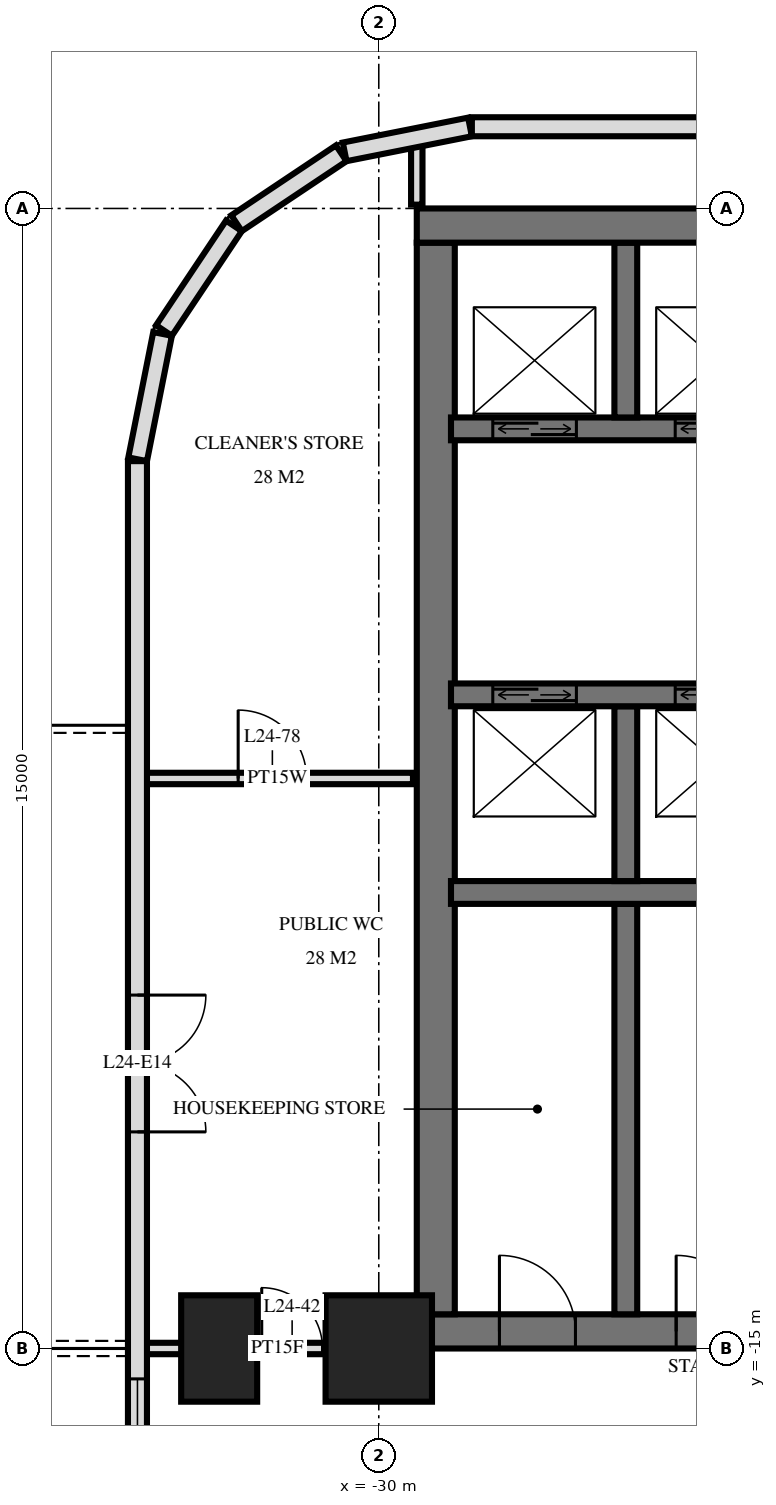
"""IFC4 building model, lengths in metres.
Left out: names, types, materials, properties, quantities, classifications, styles, units other than length and angle.
Written with IfcOpenShell. Run it as: python <this file> out.ifc"""

import sys

from ifc_helpers import new_model, si_unit, direction, frame, frame_2d, origin, origin_2d, place, context, subcontext, project, spatial, rectangle, extrude, element, fill, save


model = new_model("IFC4")
c1 = context("Model", 3, precision=1e-05, world=origin(), true_north=direction((0.0, 1.0)))
c2 = subcontext(c1, "Body", "Model", "MODEL_VIEW")
j1 = project(units=[si_unit("LENGTHUNIT", "METRE"), si_unit("PLANEANGLEUNIT", "RADIAN")], contexts=[c1])
p1 = place(None, origin())
s1 = spatial("IfcSite", under=j1, at=p1, CompositionType="ELEMENT")
p2 = place(p1, origin())
s2 = spatial("IfcBuilding", under=s1, at=p2, CompositionType="ELEMENT")
p3 = place(p2, frame((0.0, 0.0, 96.0)))
s3 = spatial("IfcBuildingStorey", under=s2, at=p3, CompositionType="ELEMENT", Elevation=96.0)
p4 = place(p3, frame((-32.1, -15.0, 0.0), z_axis=(0.0, 0.0, 1.0), x_axis=(0.0, 1.0, 0.0)))
e1 = element("IfcColumn", 1, at=p4, inside=s3, PredefinedType="COLUMN", context=c2, shape_type="SweptSolid", body=[
    extrude(rectangle(XDim=1.4, YDim=1.0, at=origin_2d()), origin(), (0.0, 0.0, 1.0), 3.6),
])
p5 = place(p3, frame((-30.0, -15.0, 0.0), z_axis=(0.0, 0.0, 1.0), x_axis=(1.0, 0.0, 0.0)))
e2 = element("IfcColumn", 2, at=p5, inside=s3, PredefinedType="COLUMN", context=c2, shape_type="SweptSolid", body=[
    extrude(rectangle(XDim=1.4, YDim=1.4, at=origin_2d()), origin(), (0.0, 0.0, 1.0), 3.6),
])
p6 = place(p3, frame((-29.5, -0.225, 0.0), z_axis=(0.0, 0.0, 1.0), x_axis=(1.0, 0.0, 0.0)))
e3 = element("IfcWall", 3, at=p6, inside=s3, PredefinedType="SHEAR", context=c2, shape_type="SweptSolid", body=[
    extrude(rectangle(XDim=19.5, YDim=0.45, at=frame_2d((9.75, 0.0))), origin(), (0.0, 0.0, 1.0), 3.6),
])
p7 = place(p3, frame((-29.5, -14.775, 0.0), z_axis=(0.0, 0.0, 1.0), x_axis=(1.0, 0.0, 0.0)))
e4 = element("IfcWall", 4, at=p7, inside=s3, PredefinedType="SHEAR", context=c2, shape_type="SweptSolid", body=[
    extrude(rectangle(XDim=19.5, YDim=0.45, at=frame_2d((9.75, 0.0))), origin(), (0.0, 0.0, 1.0), 3.6),
])
p8 = place(p7, frame((11.2, 0.0, 0.0)))
e5 = element("IfcOpeningElement", 5, at=p8, cuts=e4, PredefinedType="OPENING", context=c2, shape_type="SweptSolid", body=[
    extrude(rectangle(XDim=1.2, YDim=2.1, at=frame_2d((0.6, 1.05))), frame((0.0, 0.235, 0.0), z_axis=(0.0, -1.0, 0.0), x_axis=(1.0, 0.0, 0.0)), (0.0, 0.0, 1.0), 0.47),
])
p9 = place(p7, frame((14.25, 0.0, 0.0)))
e6 = element("IfcOpeningElement", 6, at=p9, cuts=e4, PredefinedType="OPENING", context=c2, shape_type="SweptSolid", body=[
    extrude(rectangle(XDim=1.1, YDim=2.1, at=frame_2d((0.55, 1.05))), frame((0.0, 0.235, 0.0), z_axis=(0.0, -1.0, 0.0), x_axis=(1.0, 0.0, 0.0)), (0.0, 0.0, 1.0), 0.47),
])
p10 = place(p7, frame((8.5, 0.0, 0.0)))
e7 = element("IfcOpeningElement", 7, at=p10, cuts=e4, PredefinedType="OPENING", context=c2, shape_type="SweptSolid", body=[
    extrude(rectangle(XDim=0.9, YDim=2.1, at=frame_2d((0.45, 1.05))), frame((0.0, 0.235, 0.0), z_axis=(0.0, -1.0, 0.0), x_axis=(1.0, 0.0, 0.0)), (0.0, 0.0, 1.0), 0.47),
])
p11 = place(p7, frame((6.05, 0.0, 0.0)))
e8 = element("IfcOpeningElement", 8, at=p11, cuts=e4, PredefinedType="OPENING", context=c2, shape_type="SweptSolid", body=[
    extrude(rectangle(XDim=1.0, YDim=2.1, at=frame_2d((0.5, 1.05))), frame((0.0, 0.235, 0.0), z_axis=(0.0, -1.0, 0.0), x_axis=(1.0, 0.0, 0.0)), (0.0, 0.0, 1.0), 0.47),
])
p12 = place(p7, frame((3.413, 0.0, 0.0)))
e9 = element("IfcOpeningElement", 9, at=p12, cuts=e4, PredefinedType="OPENING", context=c2, shape_type="SweptSolid", body=[
    extrude(rectangle(XDim=1.0, YDim=2.1, at=frame_2d((0.5, 1.05))), frame((0.0, 0.235, 0.0), z_axis=(0.0, -1.0, 0.0), x_axis=(1.0, 0.0, 0.0)), (0.0, 0.0, 1.0), 0.47),
])
p13 = place(p7, frame((1.087, 0.0, 0.0)))
e10 = element("IfcOpeningElement", 10, at=p13, cuts=e4, PredefinedType="OPENING", context=c2, shape_type="SweptSolid", body=[
    extrude(rectangle(XDim=1.0, YDim=2.1, at=frame_2d((0.5, 1.05))), frame((0.0, 0.235, 0.0), z_axis=(0.0, -1.0, 0.0), x_axis=(1.0, 0.0, 0.0)), (0.0, 0.0, 1.0), 0.47),
])
p14 = place(p3, frame((-29.25, -14.55, 0.0), z_axis=(0.0, 0.0, 1.0), x_axis=(0.0, 1.0, 0.0)))
e11 = element("IfcWall", 11, at=p14, inside=s3, PredefinedType="SHEAR", context=c2, shape_type="SweptSolid", body=[
    extrude(rectangle(XDim=14.1, YDim=0.5, at=frame_2d((7.05, 0.0))), origin(), (0.0, 0.0, 1.0), 3.6),
])
p15 = place(p3, frame((-29.05, -2.9, 0.0), z_axis=(0.0, 0.0, 1.0), x_axis=(1.0, 0.0, 0.0)))
e12 = element("IfcWall", 12, at=p15, inside=s3, PredefinedType="SHEAR", context=c2, shape_type="SweptSolid", body=[
    extrude(rectangle(XDim=18.7, YDim=0.3, at=frame_2d((9.35, 0.0))), origin(), (0.0, 0.0, 1.0), 3.6),
])
p16 = place(p15, frame((2.95, 0.0, 0.0)))
e13 = element("IfcOpeningElement", 13, at=p16, cuts=e12, PredefinedType="OPENING", context=c2, shape_type="SweptSolid", body=[
    extrude(rectangle(XDim=1.1, YDim=2.1, at=frame_2d((0.55, 1.05))), frame((0.0, 0.16, 0.0), z_axis=(0.0, -1.0, 0.0), x_axis=(1.0, 0.0, 0.0)), (0.0, 0.0, 1.0), 0.32),
])
p17 = place(p15, frame((0.55, 0.0, 0.0)))
e14 = element("IfcOpeningElement", 14, at=p17, cuts=e12, PredefinedType="OPENING", context=c2, shape_type="SweptSolid", body=[
    extrude(rectangle(XDim=1.1, YDim=2.1, at=frame_2d((0.55, 1.05))), frame((0.0, 0.16, 0.0), z_axis=(0.0, -1.0, 0.0), x_axis=(1.0, 0.0, 0.0)), (0.0, 0.0, 1.0), 0.32),
])
p18 = place(p15, frame((10.9, 0.0, 0.0)))
e15 = element("IfcOpeningElement", 15, at=p18, cuts=e12, PredefinedType="OPENING", context=c2, shape_type="SweptSolid", body=[
    extrude(rectangle(XDim=0.9, YDim=2.1, at=frame_2d((0.45, 1.05))), frame((0.0, 0.16, 0.0), z_axis=(0.0, -1.0, 0.0), x_axis=(1.0, 0.0, 0.0)), (0.0, 0.0, 1.0), 0.32),
])
p19 = place(p15, frame((16.85, 0.0, 0.0)))
e16 = element("IfcOpeningElement", 16, at=p19, cuts=e12, PredefinedType="OPENING", context=c2, shape_type="SweptSolid", body=[
    extrude(rectangle(XDim=1.0, YDim=2.1, at=frame_2d((0.5, 1.05))), frame((0.0, 0.16, 0.0), z_axis=(0.0, -1.0, 0.0), x_axis=(1.0, 0.0, 0.0)), (0.0, 0.0, 1.0), 0.32),
])
p20 = place(p15, frame((13.85, 0.0, 0.0)))
e17 = element("IfcOpeningElement", 17, at=p20, cuts=e12, PredefinedType="OPENING", context=c2, shape_type="SweptSolid", body=[
    extrude(rectangle(XDim=1.0, YDim=2.1, at=frame_2d((0.5, 1.05))), frame((0.0, 0.16, 0.0), z_axis=(0.0, -1.0, 0.0), x_axis=(1.0, 0.0, 0.0)), (0.0, 0.0, 1.0), 0.32),
])
p21 = place(p15, frame((5.6, 0.0, 0.0)))
e18 = element("IfcOpeningElement", 18, at=p21, cuts=e12, PredefinedType="OPENING", context=c2, shape_type="SweptSolid", body=[
    extrude(rectangle(XDim=1.0, YDim=2.1, at=frame_2d((0.5, 1.05))), frame((0.0, 0.16, 0.0), z_axis=(0.0, -1.0, 0.0), x_axis=(1.0, 0.0, 0.0)), (0.0, 0.0, 1.0), 0.32),
])
p22 = place(p3, frame((-29.05, -6.4, 0.0), z_axis=(0.0, 0.0, 1.0), x_axis=(1.0, 0.0, 0.0)))
e19 = element("IfcWall", 19, at=p22, inside=s3, PredefinedType="SHEAR", context=c2, shape_type="SweptSolid", body=[
    extrude(rectangle(XDim=18.7, YDim=0.3, at=frame_2d((9.35, 0.0))), origin(), (0.0, 0.0, 1.0), 3.6),
])
p23 = place(p22, frame((2.95, 0.0, 0.0)))
e20 = element("IfcOpeningElement", 20, at=p23, cuts=e19, PredefinedType="OPENING", context=c2, shape_type="SweptSolid", body=[
    extrude(rectangle(XDim=1.1, YDim=2.1, at=frame_2d((0.55, 1.05))), frame((0.0, 0.16, 0.0), z_axis=(0.0, -1.0, 0.0), x_axis=(1.0, 0.0, 0.0)), (0.0, 0.0, 1.0), 0.32),
])
p24 = place(p22, frame((0.55, 0.0, 0.0)))
e21 = element("IfcOpeningElement", 21, at=p24, cuts=e19, PredefinedType="OPENING", context=c2, shape_type="SweptSolid", body=[
    extrude(rectangle(XDim=1.1, YDim=2.1, at=frame_2d((0.55, 1.05))), frame((0.0, 0.16, 0.0), z_axis=(0.0, -1.0, 0.0), x_axis=(1.0, 0.0, 0.0)), (0.0, 0.0, 1.0), 0.32),
])
p25 = place(p22, frame((10.8, 0.0, 0.0)))
e22 = element("IfcOpeningElement", 22, at=p25, cuts=e19, PredefinedType="OPENING", context=c2, shape_type="SweptSolid", body=[
    extrude(rectangle(XDim=1.1, YDim=2.1, at=frame_2d((0.55, 1.05))), frame((0.0, 0.16, 0.0), z_axis=(0.0, -1.0, 0.0), x_axis=(1.0, 0.0, 0.0)), (0.0, 0.0, 1.0), 0.32),
])
p26 = place(p22, frame((5.6, 0.0, 0.0)))
e23 = element("IfcOpeningElement", 23, at=p26, cuts=e19, PredefinedType="OPENING", context=c2, shape_type="SweptSolid", body=[
    extrude(rectangle(XDim=1.0, YDim=2.1, at=frame_2d((0.5, 1.05))), frame((0.0, 0.16, 0.0), z_axis=(0.0, -1.0, 0.0), x_axis=(1.0, 0.0, 0.0)), (0.0, 0.0, 1.0), 0.32),
])
p27 = place(p3, frame((-29.05, -9.0, 0.0), z_axis=(0.0, 0.0, 1.0), x_axis=(1.0, 0.0, 0.0)))
e24 = element("IfcWall", 24, at=p27, inside=s3, PredefinedType="SHEAR", context=c2, shape_type="SweptSolid", body=[
    extrude(rectangle(XDim=18.7, YDim=0.3, at=frame_2d((9.35, 0.0))), origin(), (0.0, 0.0, 1.0), 3.6),
])
p28 = place(p27, frame((13.8, 0.0, 0.0)))
e25 = element("IfcOpeningElement", 25, at=p28, cuts=e24, PredefinedType="OPENING", context=c2, shape_type="SweptSolid", body=[
    extrude(rectangle(XDim=1.1, YDim=2.1, at=frame_2d((0.55, 1.05))), frame((0.0, 0.16, 0.0), z_axis=(0.0, -1.0, 0.0), x_axis=(1.0, 0.0, 0.0)), (0.0, 0.0, 1.0), 0.32),
])
for number, where, z_axis, x_axis in (
    (26, (-26.75, -2.75, 0.0), (0.0, 0.0, 1.0), (0.0, 1.0, 0.0)),
    (27, (-26.75, -8.85, 0.0), (0.0, 0.0, 1.0), (0.0, 1.0, 0.0)),
):
    element("IfcWall", number, at=place(p3, frame(where, z_axis=z_axis, x_axis=x_axis)), inside=s3, PredefinedType="SHEAR", context=c2, shape_type="SweptSolid", body=[
        extrude(rectangle(XDim=2.3, YDim=0.3, at=frame_2d((1.15, 0.0))), origin(), (0.0, 0.0, 1.0), 3.6),
    ])
p29 = place(p3, frame((-26.75, -14.55, 0.0), z_axis=(0.0, 0.0, 1.0), x_axis=(0.0, 1.0, 0.0)))
e28 = element("IfcWall", 28, at=p29, inside=s3, PredefinedType="SHEAR", context=c2, shape_type="SweptSolid", body=[
    extrude(rectangle(XDim=5.4, YDim=0.3, at=frame_2d((2.7, 0.0))), origin(), (0.0, 0.0, 1.0), 3.6),
])
p30 = place(p3, frame((28.775, 1.075, 0.0), z_axis=(0.0, 0.0, 1.0), x_axis=(-1.0, 0.0, 0.0)))
e29 = element("IfcWall", 29, at=p30, inside=s3, PredefinedType="SOLIDWALL", context=c2, shape_type="SweptSolid", body=[
    extrude(rectangle(XDim=57.551, YDim=0.25, at=frame_2d((28.775, 0.0))), origin(), (0.0, 0.0, 1.0), 3.32),
])
p31 = place(p30, frame((21.275, 0.0, 0.3)))
e30 = element("IfcOpeningElement", 30, at=p31, cuts=e29, PredefinedType="OPENING", context=c2, shape_type="SweptSolid", body=[
    extrude(rectangle(XDim=2.4, YDim=2.1, at=frame_2d((1.2, 1.05))), frame((0.0, 0.135, 0.0), z_axis=(0.0, -1.0, 0.0), x_axis=(1.0, 0.0, 0.0)), (0.0, 0.0, 1.0), 0.27),
])
p32 = place(p30, frame((24.275, 0.0, 0.3)))
e31 = element("IfcOpeningElement", 31, at=p32, cuts=e29, PredefinedType="OPENING", context=c2, shape_type="SweptSolid", body=[
    extrude(rectangle(XDim=2.4, YDim=2.1, at=frame_2d((1.2, 1.05))), frame((0.0, 0.135, 0.0), z_axis=(0.0, -1.0, 0.0), x_axis=(1.0, 0.0, 0.0)), (0.0, 0.0, 1.0), 0.27),
])
p33 = place(p30, frame((30.275, 0.0, 0.3)))
e32 = element("IfcOpeningElement", 32, at=p33, cuts=e29, PredefinedType="OPENING", context=c2, shape_type="SweptSolid", body=[
    extrude(rectangle(XDim=2.4, YDim=2.1, at=frame_2d((1.2, 1.05))), frame((0.0, 0.135, 0.0), z_axis=(0.0, -1.0, 0.0), x_axis=(1.0, 0.0, 0.0)), (0.0, 0.0, 1.0), 0.27),
])
p34 = place(p3, frame((-28.8, 1.073, 0.0), z_axis=(0.0, 0.0, 1.0), x_axis=(-0.980803419081, -0.194999110559, 0.0)))
e33 = element("IfcWall", 33, at=p34, inside=s3, PredefinedType="SOLIDWALL", context=c2, shape_type="SweptSolid", body=[
    extrude(rectangle(XDim=1.681, YDim=0.25, at=frame_2d((0.841, 0.0))), origin(), (0.0, 0.0, 1.0), 3.32),
])
for number, where, z_axis, x_axis in (
    (34, (-30.494, 0.726, 0.0), (0.0, 0.0, 1.0), (-0.831, -0.556, 0.0)),
    (35, (-31.906, -0.229, 0.0), (0.0, 0.0, 1.0), (-0.556, -0.831, 0.0)),
):
    element("IfcWall", number, at=place(p3, frame(where, z_axis=z_axis, x_axis=x_axis)), inside=s3, PredefinedType="SOLIDWALL", context=c2, shape_type="SweptSolid", body=[
        extrude(rectangle(XDim=1.656, YDim=0.25, at=frame_2d((0.828, 0.0))), origin(), (0.0, 0.0, 1.0), 3.32),
    ])
p35 = place(p3, frame((-32.844, -1.651, 0.0), z_axis=(0.0, 0.0, 1.0), x_axis=(-0.19513878023, -0.980775640221, 0.0)))
e36 = element("IfcWall", 36, at=p35, inside=s3, PredefinedType="SOLIDWALL", context=c2, shape_type="SweptSolid", body=[
    extrude(rectangle(XDim=1.681, YDim=0.25, at=frame_2d((0.841, 0.0))), origin(), (0.0, 0.0, 1.0), 3.32),
])
p36 = place(p3, frame((-33.175, -3.325, 0.0), z_axis=(0.0, 0.0, 1.0), x_axis=(0.0, -1.0, 0.0)))
e37 = element("IfcWall", 37, at=p36, inside=s3, PredefinedType="SOLIDWALL", context=c2, shape_type="SweptSolid", body=[
    extrude(rectangle(XDim=21.551, YDim=0.25, at=frame_2d((10.775, 0.0))), origin(), (0.0, 0.0, 1.0), 3.32),
])
p37 = place(p36, frame((7.025, 0.0, 0.0)))
e38 = element("IfcOpeningElement", 38, at=p37, cuts=e37, PredefinedType="OPENING", context=c2, shape_type="SweptSolid", body=[
    extrude(rectangle(XDim=1.8, YDim=2.4, at=frame_2d((0.9, 1.2))), frame((0.0, 0.135, 0.0), z_axis=(0.0, -1.0, 0.0), x_axis=(1.0, 0.0, 0.0)), (0.0, 0.0, 1.0), 0.27),
])
p38 = place(p36, frame((12.075, 0.0, 0.3)))
e39 = element("IfcOpeningElement", 39, at=p38, cuts=e37, PredefinedType="OPENING", context=c2, shape_type="SweptSolid", body=[
    extrude(rectangle(XDim=1.2, YDim=2.1, at=frame_2d((0.6, 1.05))), frame((0.0, 0.135, 0.0), z_axis=(0.0, -1.0, 0.0), x_axis=(1.0, 0.0, 0.0)), (0.0, 0.0, 1.0), 0.27),
])
p39 = place(p36, frame((14.575, 0.0, 0.0)))
e40 = element("IfcOpeningElement", 40, at=p39, cuts=e37, PredefinedType="OPENING", context=c2, shape_type="SweptSolid", body=[
    extrude(rectangle(XDim=1.8, YDim=2.4, at=frame_2d((0.9, 1.2))), frame((0.0, 0.135, 0.0), z_axis=(0.0, -1.0, 0.0), x_axis=(1.0, 0.0, 0.0)), (0.0, 0.0, 1.0), 0.27),
])
p40 = place(p36, frame((18.875, 0.0, 0.0)))
e41 = element("IfcOpeningElement", 41, at=p40, cuts=e37, PredefinedType="OPENING", context=c2, shape_type="SweptSolid", body=[
    extrude(rectangle(XDim=1.8, YDim=2.4, at=frame_2d((0.9, 1.2))), frame((0.0, 0.135, 0.0), z_axis=(0.0, -1.0, 0.0), x_axis=(1.0, 0.0, 0.0)), (0.0, 0.0, 1.0), 0.27),
])
p41 = place(p3, frame((-29.5, 0.05, 0.0), z_axis=(0.0, 0.0, 1.0), x_axis=(0.0, 1.0, 0.0)))
e42 = element("IfcWall", 42, at=p41, inside=s3, PredefinedType="PARTITIONING", context=c2, shape_type="SweptSolid", body=[
    extrude(rectangle(XDim=0.827, YDim=0.15, at=frame_2d((0.414, 0.0))), origin(), (0.0, 0.0, 1.0), 3.32),
])
p42 = place(p3, frame((-33.12, -15.0, 0.0), z_axis=(0.0, 0.0, 1.0), x_axis=(1.0, 0.0, 0.0)))
e43 = element("IfcWall", 43, at=p42, inside=s3, PredefinedType="PARTITIONING", context=c2, shape_type="SweptSolid", body=[
    extrude(rectangle(XDim=3.57, YDim=0.15, at=frame_2d((1.785, 0.0))), origin(), (0.0, 0.0, 1.0), 3.32),
])
p43 = place(p42, frame((1.58, 0.0, 0.0)))
e44 = element("IfcOpeningElement", 44, at=p43, cuts=e43, PredefinedType="OPENING", context=c2, shape_type="SweptSolid", body=[
    extrude(rectangle(XDim=0.8, YDim=2.1, at=frame_2d((0.4, 1.05))), frame((0.0, 0.085, 0.0), z_axis=(0.0, -1.0, 0.0), x_axis=(1.0, 0.0, 0.0)), (0.0, 0.0, 1.0), 0.17),
])
p44 = place(p3, frame((-33.12, -7.5, 0.0), z_axis=(0.0, 0.0, 1.0), x_axis=(1.0, 0.0, 0.0)))
e45 = element("IfcWall", 45, at=p44, inside=s3, PredefinedType="PLUMBINGWALL", context=c2, shape_type="SweptSolid", body=[
    extrude(rectangle(XDim=3.57, YDim=0.15, at=frame_2d((1.785, 0.0))), origin(), (0.0, 0.0, 1.0), 3.32),
])
p45 = place(p44, frame((1.27, 0.0, 0.0)))
e46 = element("IfcOpeningElement", 46, at=p45, cuts=e45, PredefinedType="OPENING", context=c2, shape_type="SweptSolid", body=[
    extrude(rectangle(XDim=0.9, YDim=2.1, at=frame_2d((0.45, 1.05))), frame((0.0, 0.085, 0.0), z_axis=(0.0, -1.0, 0.0), x_axis=(1.0, 0.0, 0.0)), (0.0, 0.0, 1.0), 0.17),
])
p46 = place(p37, origin())
e47 = element("IfcDoor", 47, at=p46, inside=s3, OperationType="DOUBLE_DOOR_SINGLE_SWING", PredefinedType="DOOR", context=c2, shape_type="SweptSolid", body=[
    extrude(rectangle(XDim=1.8, YDim=2.4, at=frame_2d((0.9, 1.2))), frame((0.0, 0.025, 0.0), z_axis=(0.0, -1.0, 0.0), x_axis=(1.0, 0.0, 0.0)), (0.0, 0.0, 1.0), 0.05),
])
fill(e38, e47)
p47 = place(p38, origin())
e48 = element("IfcWindow", 48, at=p47, inside=s3, PartitioningType="SINGLE_PANEL", PredefinedType="WINDOW", context=c2, shape_type="SweptSolid", body=[
    extrude(rectangle(XDim=1.2, YDim=2.1, at=frame_2d((0.6, 1.05))), frame((0.0, 0.03, 0.0), z_axis=(0.0, -1.0, 0.0), x_axis=(1.0, 0.0, 0.0)), (0.0, 0.0, 1.0), 0.06),
])
fill(e39, e48)
p48 = place(p16, origin())
e49 = element("IfcDoor", 49, at=p48, inside=s3, OperationType="DOUBLE_DOOR_SLIDING", PredefinedType="USERDEFINED", context=c2, shape_type="SweptSolid", body=[
    extrude(rectangle(XDim=1.1, YDim=2.1, at=frame_2d((0.55, 1.05))), frame((0.0, 0.025, 0.0), z_axis=(0.0, -1.0, 0.0), x_axis=(1.0, 0.0, 0.0)), (0.0, 0.0, 1.0), 0.05),
])
fill(e13, e49)
p49 = place(p17, origin())
e50 = element("IfcDoor", 50, at=p49, inside=s3, OperationType="DOUBLE_DOOR_SLIDING", PredefinedType="USERDEFINED", context=c2, shape_type="SweptSolid", body=[
    extrude(rectangle(XDim=1.1, YDim=2.1, at=frame_2d((0.55, 1.05))), frame((0.0, 0.025, 0.0), z_axis=(0.0, -1.0, 0.0), x_axis=(1.0, 0.0, 0.0)), (0.0, 0.0, 1.0), 0.05),
])
fill(e14, e50)
p50 = place(p23, origin())
e51 = element("IfcDoor", 51, at=p50, inside=s3, OperationType="DOUBLE_DOOR_SLIDING", PredefinedType="USERDEFINED", context=c2, shape_type="SweptSolid", body=[
    extrude(rectangle(XDim=1.1, YDim=2.1, at=frame_2d((0.55, 1.05))), frame((0.0, 0.025, 0.0), z_axis=(0.0, -1.0, 0.0), x_axis=(1.0, 0.0, 0.0)), (0.0, 0.0, 1.0), 0.05),
])
fill(e20, e51)
p51 = place(p24, origin())
e52 = element("IfcDoor", 52, at=p51, inside=s3, OperationType="DOUBLE_DOOR_SLIDING", PredefinedType="USERDEFINED", context=c2, shape_type="SweptSolid", body=[
    extrude(rectangle(XDim=1.1, YDim=2.1, at=frame_2d((0.55, 1.05))), frame((0.0, 0.025, 0.0), z_axis=(0.0, -1.0, 0.0), x_axis=(1.0, 0.0, 0.0)), (0.0, 0.0, 1.0), 0.05),
])
fill(e21, e52)
p52 = place(p12, origin())
e53 = element("IfcDoor", 53, at=p52, inside=s3, OperationType="SINGLE_SWING_RIGHT", PredefinedType="DOOR", context=c2, shape_type="SweptSolid", body=[
    extrude(rectangle(XDim=1.0, YDim=2.1, at=frame_2d((0.5, 1.05))), frame((0.0, 0.025, 0.0), z_axis=(0.0, -1.0, 0.0), x_axis=(1.0, 0.0, 0.0)), (0.0, 0.0, 1.0), 0.05),
])
fill(e9, e53)
p53 = place(p13, origin())
e54 = element("IfcDoor", 54, at=p53, inside=s3, OperationType="SINGLE_SWING_RIGHT", PredefinedType="DOOR", context=c2, shape_type="SweptSolid", body=[
    extrude(rectangle(XDim=1.0, YDim=2.1, at=frame_2d((0.5, 1.05))), frame((0.0, 0.025, 0.0), z_axis=(0.0, -1.0, 0.0), x_axis=(1.0, 0.0, 0.0)), (0.0, 0.0, 1.0), 0.05),
])
fill(e10, e54)
p54 = place(p43, origin())
e55 = element("IfcDoor", 55, at=p54, inside=s3, OperationType="SINGLE_SWING_RIGHT", PredefinedType="DOOR", context=c2, shape_type="SweptSolid", body=[
    extrude(rectangle(XDim=0.8, YDim=2.1, at=frame_2d((0.4, 1.05))), frame((0.0, 0.025, 0.0), z_axis=(0.0, -1.0, 0.0), x_axis=(1.0, 0.0, 0.0)), (0.0, 0.0, 1.0), 0.05),
])
fill(e44, e55)
p55 = place(p45, origin())
e56 = element("IfcDoor", 56, at=p55, inside=s3, OperationType="SINGLE_SWING_RIGHT", PredefinedType="DOOR", context=c2, shape_type="SweptSolid", body=[
    extrude(rectangle(XDim=0.9, YDim=2.1, at=frame_2d((0.45, 1.05))), frame((0.0, 0.025, 0.0), z_axis=(0.0, -1.0, 0.0), x_axis=(1.0, 0.0, 0.0)), (0.0, 0.0, 1.0), 0.05),
])
fill(e46, e56)
save(model, sys.argv[1])
